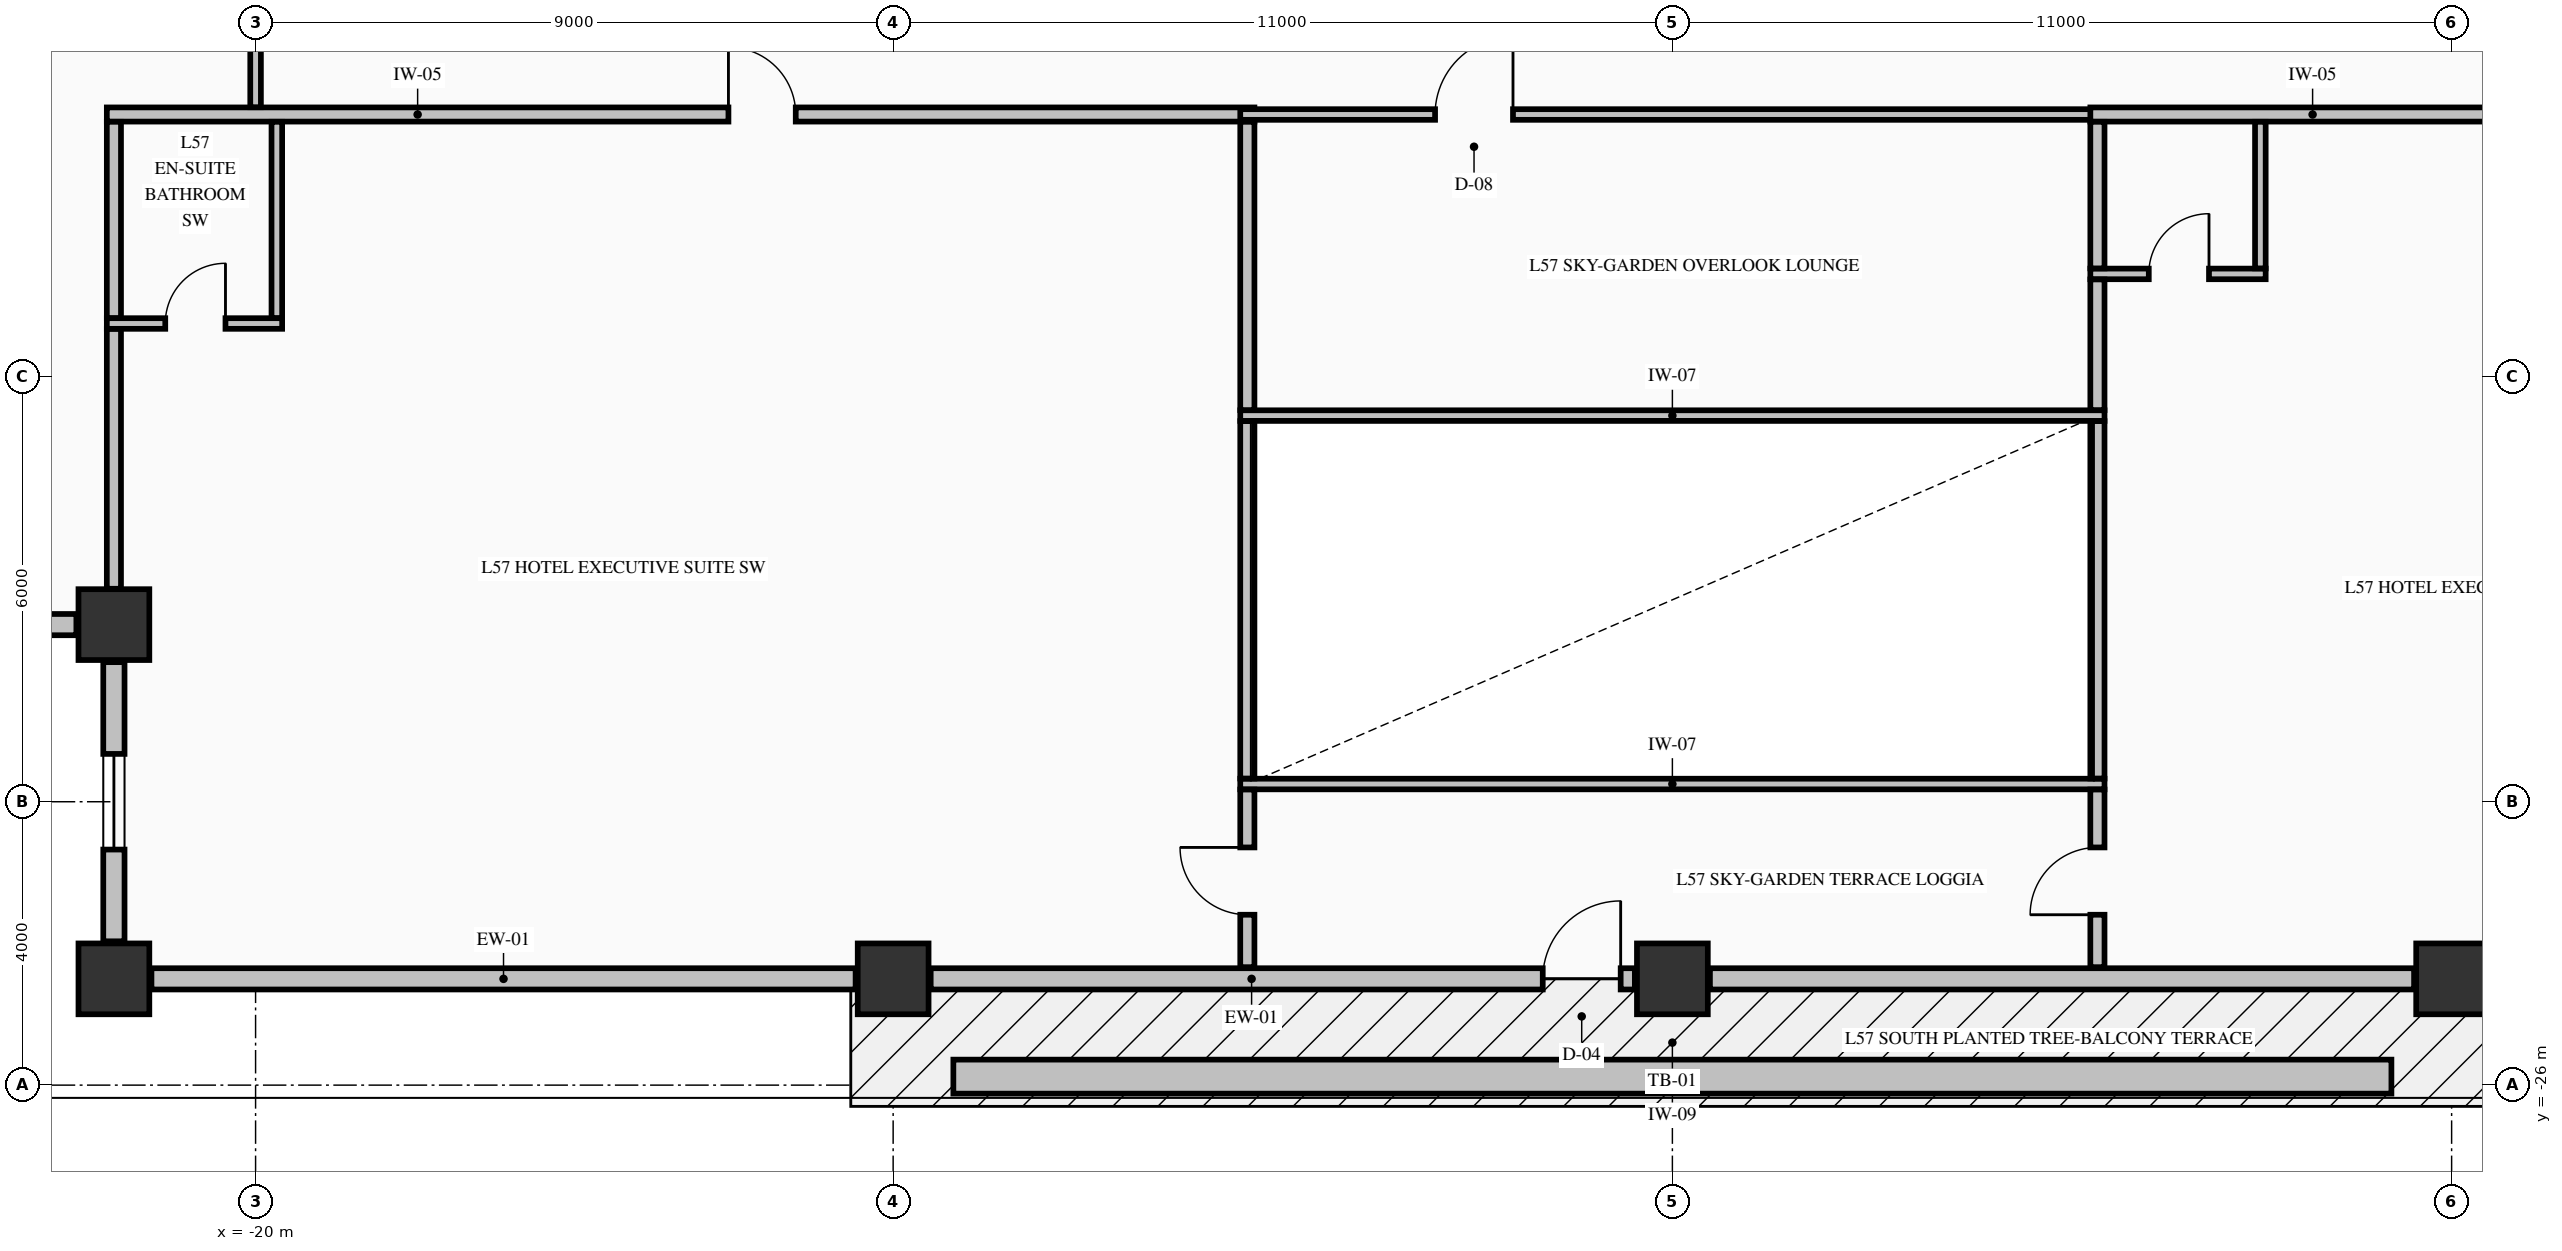
"""IFC4 building model, lengths in metres.
Left out: names, types, materials, properties, quantities, classifications, styles, units other than length and angle.
Written with IfcOpenShell. Run it as: python <this file> out.ifc"""

import sys

from ifc_helpers import new_model, si_unit, direction, frame, frame_2d, origin, origin_2d, place, context, subcontext, project, spatial, rectangle, extrude, element, fill, save


model = new_model("IFC4")
c1 = context("Model", 3, precision=1e-05, world=origin(), true_north=direction((0.0, 1.0)))
c2 = subcontext(c1, "Body", "Model", "MODEL_VIEW")
j1 = project(units=[si_unit("LENGTHUNIT", "METRE"), si_unit("PLANEANGLEUNIT", "RADIAN")], contexts=[c1])
p1 = place(None, origin())
s1 = spatial("IfcSite", under=j1, at=p1, CompositionType="ELEMENT")
p2 = place(p1, origin())
s2 = spatial("IfcBuilding", under=s1, at=p2, CompositionType="ELEMENT")
p3 = place(p2, frame((0.0, 0.0, 218.66)))
s3 = spatial("IfcBuildingStorey", under=s2, at=p3, CompositionType="ELEMENT", Elevation=218.66)
for number, where, z_axis, x_axis in (
    (1, (-22.0, -24.5, -0.25), (0.0, 0.0, 1.0), (1.0, 0.0, 0.0)),
    (2, (-11.0, -24.5, -0.25), (0.0, 0.0, 1.0), (1.0, 0.0, 0.0)),
    (3, (0.0, -24.5, -0.25), (0.0, 0.0, 1.0), (1.0, 0.0, 0.0)),
    (4, (11.0, -24.5, -0.25), (0.0, 0.0, 1.0), (1.0, 0.0, 0.0)),
    (5, (-22.0, -19.5, -0.25), (0.0, 0.0, 1.0), (1.0, 0.0, 0.0)),
):
    element("IfcColumn", number, at=place(p3, frame(where, z_axis=z_axis, x_axis=x_axis)), inside=s3, PredefinedType="COLUMN", context=c2, shape_type="SweptSolid", body=[
        extrude(rectangle(XDim=1.0, YDim=1.0, at=origin_2d()), origin(), (0.0, 0.0, 1.0), 3.225),
    ])
p4 = place(p3, frame((-26.47, -19.5, 0.0), z_axis=(0.0, 0.0, 1.0), x_axis=(1.0, 0.0, 0.0)))
e6 = element("IfcWall", 6, at=p4, inside=s3, PredefinedType="STANDARD", context=c2, shape_type="SweptSolid", body=[
    extrude(rectangle(XDim=3.94, YDim=0.3, at=frame_2d((1.97, 0.0))), origin(), (0.0, 0.0, 1.0), 2.367),
])
p5 = place(p4, frame((1.295, 0.0, 0.68)))
e7 = element("IfcOpeningElement", 7, at=p5, cuts=e6, PredefinedType="OPENING", context=c2, shape_type="SweptSolid", body=[
    extrude(rectangle(XDim=1.35, YDim=1.42, at=frame_2d((0.675, 0.71))), frame((0.0, 0.16, 0.0), z_axis=(0.0, -1.0, 0.0), x_axis=(1.0, 0.0, 0.0)), (0.0, 0.0, 1.0), 0.32),
])
p6 = place(p3, frame((-22.0, -20.03, 0.0), z_axis=(0.0, 0.0, 1.0), x_axis=(0.0, -1.0, 0.0)))
e8 = element("IfcWall", 8, at=p6, inside=s3, PredefinedType="STANDARD", context=c2, shape_type="SweptSolid", body=[
    extrude(rectangle(XDim=3.94, YDim=0.3, at=frame_2d((1.97, 0.0))), origin(), (0.0, 0.0, 1.0), 2.367),
])
p7 = place(p6, frame((1.295, 0.0, 0.68)))
e9 = element("IfcOpeningElement", 9, at=p7, cuts=e8, PredefinedType="OPENING", context=c2, shape_type="SweptSolid", body=[
    extrude(rectangle(XDim=1.35, YDim=1.42, at=frame_2d((0.675, 0.71))), frame((0.0, 0.16, 0.0), z_axis=(0.0, -1.0, 0.0), x_axis=(1.0, 0.0, 0.0)), (0.0, 0.0, 1.0), 0.32),
])
p8 = place(p3, frame((-21.47, -24.5, 0.0), z_axis=(0.0, 0.0, 1.0), x_axis=(1.0, 0.0, 0.0)))
e10 = element("IfcWall", 10, at=p8, inside=s3, PredefinedType="STANDARD", context=c2, shape_type="SweptSolid", body=[
    extrude(rectangle(XDim=9.94, YDim=0.3, at=frame_2d((4.97, 0.0))), origin(), (0.0, 0.0, 1.0), 2.367),
])
p9 = place(p3, frame((-10.47, -24.5, 0.0), z_axis=(0.0, 0.0, 1.0), x_axis=(1.0, 0.0, 0.0)))
e11 = element("IfcWall", 11, at=p9, inside=s3, PredefinedType="STANDARD", context=c2, shape_type="SweptSolid", body=[
    extrude(rectangle(XDim=9.94, YDim=0.3, at=frame_2d((4.97, 0.0))), origin(), (0.0, 0.0, 1.0), 2.367),
])
p10 = place(p9, frame((8.64, 0.0, 0.0)))
e12 = element("IfcOpeningElement", 12, at=p10, cuts=e11, PredefinedType="OPENING", context=c2, shape_type="SweptSolid", body=[
    extrude(rectangle(XDim=1.1, YDim=2.15, at=frame_2d((0.55, 1.075))), frame((0.0, 0.16, 0.0), z_axis=(0.0, -1.0, 0.0), x_axis=(1.0, 0.0, 0.0)), (0.0, 0.0, 1.0), 0.32),
])
p11 = place(p3, frame((0.53, -24.5, 0.0), z_axis=(0.0, 0.0, 1.0), x_axis=(1.0, 0.0, 0.0)))
e13 = element("IfcWall", 13, at=p11, inside=s3, PredefinedType="STANDARD", context=c2, shape_type="SweptSolid", body=[
    extrude(rectangle(XDim=9.94, YDim=0.3, at=frame_2d((4.97, 0.0))), origin(), (0.0, 0.0, 1.0), 2.367),
])
for number, where, z_axis, x_axis in (
    (14, (-6.1, -21.75, 0.0), (0.0, 0.0, 1.0), (1.0, 0.0, 0.0)),
    (15, (-6.1, -16.55, 0.0), (0.0, 0.0, 1.0), (1.0, 0.0, 0.0)),
):
    element("IfcWall", number, at=place(p3, frame(where, z_axis=z_axis, x_axis=x_axis)), inside=s3, PredefinedType="PARTITIONING", context=c2, shape_type="SweptSolid", body=[
        extrude(rectangle(XDim=12.2, YDim=0.15, at=frame_2d((6.1, 0.0))), origin(), (0.0, 0.0, 1.0), 2.975),
    ])
p12 = place(p3, frame((-22.1, -15.25, 0.0), z_axis=(0.0, 0.0, 1.0), x_axis=(1.0, 0.0, 0.0)))
e16 = element("IfcWall", 16, at=p12, inside=s3, PredefinedType="PARTITIONING", context=c2, shape_type="SweptSolid", body=[
    extrude(rectangle(XDim=2.475, YDim=0.15, at=frame_2d((1.238, 0.0))), origin(), (0.0, 0.0, 1.0), 2.975),
])
p13 = place(p12, frame((0.825, 0.0, 0.0)))
e17 = element("IfcOpeningElement", 17, at=p13, cuts=e16, PredefinedType="OPENING", context=c2, shape_type="SweptSolid", body=[
    extrude(rectangle(XDim=0.85, YDim=2.1, at=frame_2d((0.425, 1.05))), frame((0.0, 0.085, 0.0), z_axis=(0.0, -1.0, 0.0), x_axis=(1.0, 0.0, 0.0)), (0.0, 0.0, 1.0), 0.17),
])
p14 = place(p3, frame((5.9, -14.55, 0.0), z_axis=(0.0, 0.0, 1.0), x_axis=(1.0, 0.0, 0.0)))
e18 = element("IfcWall", 18, at=p14, inside=s3, PredefinedType="PARTITIONING", context=c2, shape_type="SweptSolid", body=[
    extrude(rectangle(XDim=2.475, YDim=0.15, at=frame_2d((1.238, 0.0))), origin(), (0.0, 0.0, 1.0), 2.975),
])
p15 = place(p14, frame((0.825, 0.0, 0.0)))
e19 = element("IfcOpeningElement", 19, at=p15, cuts=e18, PredefinedType="OPENING", context=c2, shape_type="SweptSolid", body=[
    extrude(rectangle(XDim=0.85, YDim=2.1, at=frame_2d((0.425, 1.05))), frame((0.0, 0.085, 0.0), z_axis=(0.0, -1.0, 0.0), x_axis=(1.0, 0.0, 0.0)), (0.0, 0.0, 1.0), 0.17),
])
p16 = place(p3, frame((-22.1, -12.3, 0.0), z_axis=(0.0, 0.0, 1.0), x_axis=(1.0, 0.0, 0.0)))
e20 = element("IfcWall", 20, at=p16, inside=s3, PredefinedType="PARTITIONING", context=c2, shape_type="SweptSolid", body=[
    extrude(rectangle(XDim=16.2, YDim=0.2, at=frame_2d((8.1, 0.0))), origin(), (0.0, 0.0, 1.0), 2.975),
])
p17 = place(p16, frame((8.775, 0.0, 0.0)))
e21 = element("IfcOpeningElement", 21, at=p17, cuts=e20, PredefinedType="OPENING", context=c2, shape_type="SweptSolid", body=[
    extrude(rectangle(XDim=0.95, YDim=2.15, at=frame_2d((0.475, 1.075))), frame((0.0, 0.11, 0.0), z_axis=(0.0, -1.0, 0.0), x_axis=(1.0, 0.0, 0.0)), (0.0, 0.0, 1.0), 0.22),
])
p18 = place(p3, frame((-6.1, -12.3, 0.0), z_axis=(0.0, 0.0, 1.0), x_axis=(1.0, 0.0, 0.0)))
e22 = element("IfcWall", 22, at=p18, inside=s3, PredefinedType="PARTITIONING", context=c2, shape_type="SweptSolid", body=[
    extrude(rectangle(XDim=12.2, YDim=0.15, at=frame_2d((6.1, 0.0))), origin(), (0.0, 0.0, 1.0), 2.975),
])
p19 = place(p18, frame((2.75, 0.0, 0.0)))
e23 = element("IfcOpeningElement", 23, at=p19, cuts=e22, PredefinedType="OPENING", context=c2, shape_type="SweptSolid", body=[
    extrude(rectangle(XDim=1.1, YDim=2.15, at=frame_2d((0.55, 1.075))), frame((0.0, 0.085, 0.0), z_axis=(0.0, -1.0, 0.0), x_axis=(1.0, 0.0, 0.0)), (0.0, 0.0, 1.0), 0.17),
])
p20 = place(p3, frame((5.9, -12.3, 0.0), z_axis=(0.0, 0.0, 1.0), x_axis=(1.0, 0.0, 0.0)))
e24 = element("IfcWall", 24, at=p20, inside=s3, PredefinedType="PARTITIONING", context=c2, shape_type="SweptSolid", body=[
    extrude(rectangle(XDim=11.2, YDim=0.2, at=frame_2d((5.6, 0.0))), origin(), (0.0, 0.0, 1.0), 2.975),
])
p21 = place(p20, frame((6.275, 0.0, 0.0)))
e25 = element("IfcOpeningElement", 25, at=p21, cuts=e24, PredefinedType="OPENING", context=c2, shape_type="SweptSolid", body=[
    extrude(rectangle(XDim=0.95, YDim=2.15, at=frame_2d((0.475, 1.075))), frame((0.0, 0.11, 0.0), z_axis=(0.0, -1.0, 0.0), x_axis=(1.0, 0.0, 0.0)), (0.0, 0.0, 1.0), 0.22),
])
p22 = place(p3, frame((-22.0, -18.994, 0.0), z_axis=(0.0, 0.0, 1.0), x_axis=(0.0, 1.0, 0.0)))
e26 = element("IfcWall", 26, at=p22, inside=s3, PredefinedType="PARTITIONING", context=c2, shape_type="SweptSolid", body=[
    extrude(rectangle(XDim=3.666, YDim=0.2, at=frame_2d((1.833, 0.0))), origin(), (0.0, 0.0, 1.0), 2.975),
])
p23 = place(p3, frame((-22.0, -15.172, 0.0), z_axis=(0.0, 0.0, 1.0), x_axis=(0.0, 1.0, 0.0)))
e27 = element("IfcWall", 27, at=p23, inside=s3, PredefinedType="PARTITIONING", context=c2, shape_type="SweptSolid", body=[
    extrude(rectangle(XDim=2.769, YDim=0.2, at=frame_2d((1.385, 0.0))), origin(), (0.0, 0.0, 1.0), 2.975),
])
p24 = place(p3, frame((-20.0, -12.197, 0.0), z_axis=(0.0, 0.0, 1.0), x_axis=(0.0, 1.0, 0.0)))
e28 = element("IfcWall", 28, at=p24, inside=s3, PredefinedType="PARTITIONING", context=c2, shape_type="SweptSolid", body=[
    extrude(rectangle(XDim=1.816, YDim=0.15, at=frame_2d((0.908, 0.0))), origin(), (0.0, 0.0, 1.0), 2.167),
])
p25 = place(p3, frame((-19.7, -15.172, 0.0), z_axis=(0.0, 0.0, 1.0), x_axis=(0.0, 1.0, 0.0)))
e29 = element("IfcWall", 29, at=p25, inside=s3, PredefinedType="PARTITIONING", context=c2, shape_type="SweptSolid", body=[
    extrude(rectangle(XDim=2.769, YDim=0.15, at=frame_2d((1.385, 0.0))), origin(), (0.0, 0.0, 1.0), 2.167),
])
p26 = place(p3, frame((-6.0, -24.335, 0.0), z_axis=(0.0, 0.0, 1.0), x_axis=(0.0, 1.0, 0.0)))
e30 = element("IfcWall", 30, at=p26, inside=s3, PredefinedType="PARTITIONING", context=c2, shape_type="SweptSolid", body=[
    extrude(rectangle(XDim=2.507, YDim=0.2, at=frame_2d((1.253, 0.0))), origin(), (0.0, 0.0, 1.0), 2.975),
])
p27 = place(p26, frame((0.74, 0.0, 0.0)))
e31 = element("IfcOpeningElement", 31, at=p27, cuts=e30, PredefinedType="OPENING", context=c2, shape_type="SweptSolid", body=[
    extrude(rectangle(XDim=0.95, YDim=2.15, at=frame_2d((0.475, 1.075))), frame((0.0, 0.11, 0.0), z_axis=(0.0, -1.0, 0.0), x_axis=(1.0, 0.0, 0.0)), (0.0, 0.0, 1.0), 0.22),
])
p28 = place(p3, frame((-6.0, -21.672, 0.0), z_axis=(0.0, 0.0, 1.0), x_axis=(0.0, 1.0, 0.0)))
e32 = element("IfcWall", 32, at=p28, inside=s3, PredefinedType="PARTITIONING", context=c2, shape_type="SweptSolid", body=[
    extrude(rectangle(XDim=5.044, YDim=0.2, at=frame_2d((2.522, 0.0))), origin(), (0.0, 0.0, 1.0), 2.975),
])
p29 = place(p3, frame((-6.0, -16.472, 0.0), z_axis=(0.0, 0.0, 1.0), x_axis=(0.0, 1.0, 0.0)))
e33 = element("IfcWall", 33, at=p29, inside=s3, PredefinedType="PARTITIONING", context=c2, shape_type="SweptSolid", body=[
    extrude(rectangle(XDim=4.069, YDim=0.2, at=frame_2d((2.034, 0.0))), origin(), (0.0, 0.0, 1.0), 2.975),
])
p30 = place(p3, frame((6.0, -24.335, 0.0), z_axis=(0.0, 0.0, 1.0), x_axis=(0.0, 1.0, 0.0)))
e34 = element("IfcWall", 34, at=p30, inside=s3, PredefinedType="PARTITIONING", context=c2, shape_type="SweptSolid", body=[
    extrude(rectangle(XDim=2.507, YDim=0.2, at=frame_2d((1.253, 0.0))), origin(), (0.0, 0.0, 1.0), 2.975),
])
p31 = place(p30, frame((0.74, 0.0, 0.0)))
e35 = element("IfcOpeningElement", 35, at=p31, cuts=e34, PredefinedType="OPENING", context=c2, shape_type="SweptSolid", body=[
    extrude(rectangle(XDim=0.95, YDim=2.15, at=frame_2d((0.475, 1.075))), frame((0.0, 0.11, 0.0), z_axis=(0.0, -1.0, 0.0), x_axis=(1.0, 0.0, 0.0)), (0.0, 0.0, 1.0), 0.22),
])
p32 = place(p3, frame((6.0, -21.672, 0.0), z_axis=(0.0, 0.0, 1.0), x_axis=(0.0, 1.0, 0.0)))
e36 = element("IfcWall", 36, at=p32, inside=s3, PredefinedType="PARTITIONING", context=c2, shape_type="SweptSolid", body=[
    extrude(rectangle(XDim=5.044, YDim=0.2, at=frame_2d((2.522, 0.0))), origin(), (0.0, 0.0, 1.0), 2.975),
])
p33 = place(p3, frame((6.0, -16.472, 0.0), z_axis=(0.0, 0.0, 1.0), x_axis=(0.0, 1.0, 0.0)))
e37 = element("IfcWall", 37, at=p33, inside=s3, PredefinedType="PARTITIONING", context=c2, shape_type="SweptSolid", body=[
    extrude(rectangle(XDim=1.844, YDim=0.2, at=frame_2d((0.922, 0.0))), origin(), (0.0, 0.0, 1.0), 2.975),
])
p34 = place(p3, frame((6.0, -14.472, 0.0), z_axis=(0.0, 0.0, 1.0), x_axis=(0.0, 1.0, 0.0)))
e38 = element("IfcWall", 38, at=p34, inside=s3, PredefinedType="PARTITIONING", context=c2, shape_type="SweptSolid", body=[
    extrude(rectangle(XDim=2.069, YDim=0.2, at=frame_2d((1.034, 0.0))), origin(), (0.0, 0.0, 1.0), 2.975),
])
p35 = place(p3, frame((8.3, -14.472, 0.0), z_axis=(0.0, 0.0, 1.0), x_axis=(0.0, 1.0, 0.0)))
e39 = element("IfcWall", 39, at=p35, inside=s3, PredefinedType="PARTITIONING", context=c2, shape_type="SweptSolid", body=[
    extrude(rectangle(XDim=2.069, YDim=0.15, at=frame_2d((1.034, 0.0))), origin(), (0.0, 0.0, 1.0), 2.975),
])
p36 = place(p3, frame((-10.15, -25.88, -0.04), z_axis=(0.0, 0.0, 1.0), x_axis=(1.0, 0.0, 0.0)))
e40 = element("IfcWall", 40, at=p36, inside=s3, PredefinedType="PARAPET", context=c2, shape_type="SweptSolid", body=[
    extrude(rectangle(XDim=20.3, YDim=0.48, at=frame_2d((10.15, 0.0))), origin(), (0.0, 0.0, 1.0), 0.52),
])
p37 = place(p7, origin())
e41 = element("IfcWindow", 41, at=p37, inside=s3, PartitioningType="SINGLE_PANEL", PredefinedType="WINDOW", context=c2, shape_type="SweptSolid", body=[
    extrude(rectangle(XDim=1.35, YDim=1.42, at=frame_2d((0.675, 0.71))), frame((0.0, 0.03, 0.0), z_axis=(0.0, -1.0, 0.0), x_axis=(1.0, 0.0, 0.0)), (0.0, 0.0, 1.0), 0.06),
])
fill(e9, e41)
p38 = place(p10, origin())
e42 = element("IfcDoor", 42, at=p38, inside=s3, OperationType="SINGLE_SWING_RIGHT", PredefinedType="DOOR", context=c2, shape_type="SweptSolid", body=[
    extrude(rectangle(XDim=1.1, YDim=2.15, at=frame_2d((0.55, 1.075))), frame((0.0, 0.025, 0.0), z_axis=(0.0, -1.0, 0.0), x_axis=(1.0, 0.0, 0.0)), (0.0, 0.0, 1.0), 0.05),
])
fill(e12, e42)
p39 = place(p27, origin())
e43 = element("IfcDoor", 43, at=p39, inside=s3, OperationType="SINGLE_SWING_RIGHT", PredefinedType="DOOR", context=c2, shape_type="SweptSolid", body=[
    extrude(rectangle(XDim=0.95, YDim=2.15, at=frame_2d((0.475, 1.075))), frame((0.0, 0.025, 0.0), z_axis=(0.0, -1.0, 0.0), x_axis=(1.0, 0.0, 0.0)), (0.0, 0.0, 1.0), 0.05),
])
fill(e31, e43)
p40 = place(p31, origin())
e44 = element("IfcDoor", 44, at=p40, inside=s3, OperationType="SINGLE_SWING_LEFT", PredefinedType="DOOR", context=c2, shape_type="SweptSolid", body=[
    extrude(rectangle(XDim=0.95, YDim=2.15, at=frame_2d((0.475, 1.075))), frame((0.0, 0.025, 0.0), z_axis=(0.0, -1.0, 0.0), x_axis=(1.0, 0.0, 0.0)), (0.0, 0.0, 1.0), 0.05),
])
fill(e35, e44)
p41 = place(p19, origin())
e45 = element("IfcDoor", 45, at=p41, inside=s3, OperationType="SINGLE_SWING_RIGHT", PredefinedType="DOOR", context=c2, shape_type="SweptSolid", body=[
    extrude(rectangle(XDim=1.1, YDim=2.15, at=frame_2d((0.55, 1.075))), frame((0.0, 0.025, 0.0), z_axis=(0.0, -1.0, 0.0), x_axis=(1.0, 0.0, 0.0)), (0.0, 0.0, 1.0), 0.05),
])
fill(e23, e45)
p42 = place(p17, origin())
e46 = element("IfcDoor", 46, at=p42, inside=s3, OperationType="SINGLE_SWING_LEFT", PredefinedType="DOOR", context=c2, shape_type="SweptSolid", body=[
    extrude(rectangle(XDim=0.95, YDim=2.15, at=frame_2d((0.475, 1.075))), frame((0.0, 0.025, 0.0), z_axis=(0.0, -1.0, 0.0), x_axis=(1.0, 0.0, 0.0)), (0.0, 0.0, 1.0), 0.05),
])
fill(e21, e46)
p43 = place(p13, origin())
e47 = element("IfcDoor", 47, at=p43, inside=s3, OperationType="SINGLE_SWING_RIGHT", PredefinedType="DOOR", context=c2, shape_type="SweptSolid", body=[
    extrude(rectangle(XDim=0.85, YDim=2.1, at=frame_2d((0.425, 1.05))), frame((0.0, 0.025, 0.0), z_axis=(0.0, -1.0, 0.0), x_axis=(1.0, 0.0, 0.0)), (0.0, 0.0, 1.0), 0.05),
])
fill(e17, e47)
p44 = place(p15, origin())
e48 = element("IfcDoor", 48, at=p44, inside=s3, OperationType="SINGLE_SWING_RIGHT", PredefinedType="DOOR", context=c2, shape_type="SweptSolid", body=[
    extrude(rectangle(XDim=0.85, YDim=2.1, at=frame_2d((0.425, 1.05))), frame((0.0, 0.025, 0.0), z_axis=(0.0, -1.0, 0.0), x_axis=(1.0, 0.0, 0.0)), (0.0, 0.0, 1.0), 0.05),
])
fill(e19, e48)
save(model, sys.argv[1])
